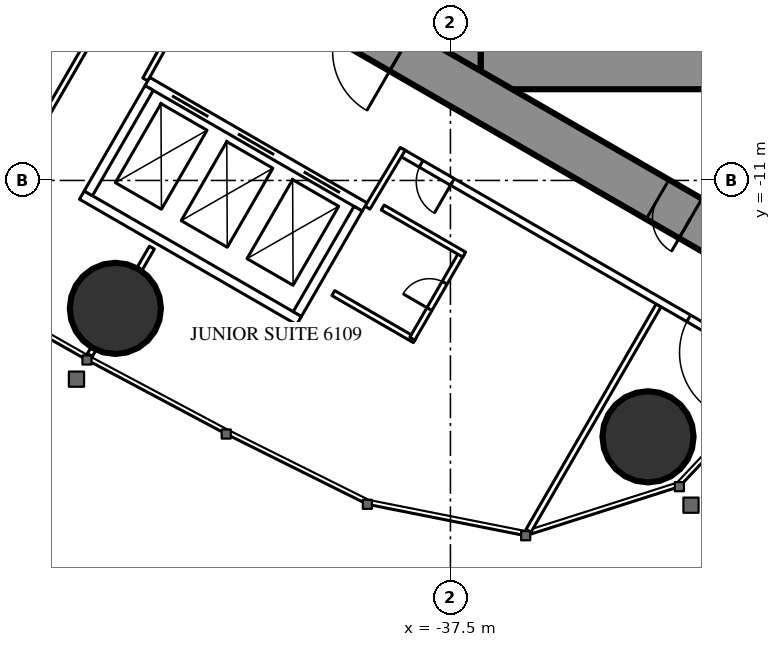
"""IFC4 building model, lengths in metres.
Left out: names, types, materials, properties, quantities, classifications, styles, units other than length and angle.
Written with IfcOpenShell. Run it as: python <this file> out.ifc"""

import sys

from ifc_helpers import new_model, si_unit, direction, frame, frame_2d, origin, origin_2d, place, context, subcontext, project, spatial, rectangle, circle, extrude, element, fill, save


model = new_model("IFC4")
c1 = context("Model", 3, precision=1e-05, world=origin(), true_north=direction((0.0, 1.0)))
c2 = subcontext(c1, "Body", "Model", "MODEL_VIEW")
j1 = project(units=[si_unit("LENGTHUNIT", "METRE"), si_unit("PLANEANGLEUNIT", "RADIAN")], contexts=[c1])
p1 = place(None, origin())
s1 = spatial("IfcSite", under=j1, at=p1, CompositionType="ELEMENT")
p2 = place(p1, origin())
s2 = spatial("IfcBuilding", under=s1, at=p2, CompositionType="ELEMENT")
p3 = place(p2, frame((0.0, 0.0, 229.7)))
s3 = spatial("IfcBuildingStorey", under=s2, at=p3, CompositionType="ELEMENT", Elevation=229.7)
for number, where, z_axis, x_axis in (
    (1, (-32.301, -17.745, 0.0), (0.0, 0.0, 1.0), (1.0, 0.0, 0.0)),
    (2, (-46.317, -14.365, 0.0), (0.0, 0.0, 1.0), (1.0, 0.0, 0.0)),
):
    element("IfcColumn", number, at=place(p3, frame(where, z_axis=z_axis, x_axis=x_axis)), inside=s3, PredefinedType="COLUMN", context=c2, shape_type="SweptSolid", body=[
        extrude(circle(Radius=1.2, at=origin_2d()), origin(), (0.0, 0.0, 1.0), 3.6),
    ])
p4 = place(p3, frame((-37.3, 8.6, 0.0), z_axis=(0.0, 0.0, 1.0), x_axis=(0.0, -1.0, 0.0)))
e3 = element("IfcWall", 3, at=p4, inside=s3, PredefinedType="SHEAR", context=c2, shape_type="SweptSolid", body=[
    extrude(rectangle(XDim=17.2, YDim=1.2, at=frame_2d((8.6, 0.0))), origin(), (0.0, 0.0, 1.0), 3.6),
])
p5 = place(p4, frame((7.7, 0.0, 0.0)))
e4 = element("IfcOpeningElement", 4, at=p5, cuts=e3, PredefinedType="OPENING", context=c2, shape_type="SweptSolid", body=[
    extrude(rectangle(XDim=1.8, YDim=2.2, at=frame_2d((0.9, 1.1))), frame((0.0, 0.61, 0.0), z_axis=(0.0, -1.0, 0.0), x_axis=(1.0, 0.0, 0.0)), (0.0, 0.0, 1.0), 1.22),
])
p6 = place(p3, frame((-28.3, -8.0, 0.0), z_axis=(0.0, 0.0, 1.0), x_axis=(-1.0, 0.0, 0.0)))
e5 = element("IfcWall", 5, at=p6, inside=s3, PredefinedType="SHEAR", context=c2, shape_type="SweptSolid", body=[
    extrude(rectangle(XDim=8.4, YDim=1.2, at=frame_2d((4.2, 0.0))), origin(), (0.0, 0.0, 1.0), 3.6),
])
p7 = place(p6, frame((0.25, 0.0, 0.0)))
e6 = element("IfcOpeningElement", 6, at=p7, cuts=e5, PredefinedType="OPENING", context=c2, shape_type="SweptSolid", body=[
    extrude(rectangle(XDim=1.0, YDim=2.2, at=frame_2d((0.5, 1.1))), frame((0.0, 0.61, 0.0), z_axis=(0.0, -1.0, 0.0), x_axis=(1.0, 0.0, 0.0)), (0.0, 0.0, 1.0), 1.22),
])
p8 = place(p3, frame((-27.2, -14.3, 0.0), z_axis=(0.0, 0.0, 1.0), x_axis=(-0.866024021859, 0.500002393557, 0.0)))
e7 = element("IfcWall", 7, at=p8, inside=s3, PredefinedType="SHEAR", context=c2, shape_type="SweptSolid", body=[
    extrude(rectangle(XDim=27.907, YDim=1.2, at=frame_2d((13.954, 0.0))), origin(), (0.0, 0.0, 1.0), 3.6),
])
p9 = place(p8, frame((4.6, 0.0, 0.0)))
e8 = element("IfcOpeningElement", 8, at=p9, cuts=e7, PredefinedType="OPENING", context=c2, shape_type="SweptSolid", body=[
    extrude(rectangle(XDim=1.0, YDim=2.2, at=frame_2d((0.5, 1.1))), frame((0.0, 0.61, 0.0), z_axis=(0.0, -1.0, 0.0), x_axis=(1.0, 0.0, 0.0)), (0.0, 0.0, 1.0), 1.22),
])
p10 = place(p8, frame((13.395, 0.0, 0.0)))
e9 = element("IfcOpeningElement", 9, at=p10, cuts=e7, PredefinedType="OPENING", context=c2, shape_type="SweptSolid", body=[
    extrude(rectangle(XDim=1.8, YDim=2.2, at=frame_2d((0.9, 1.1))), frame((0.0, 0.61, 0.0), z_axis=(0.0, -1.0, 0.0), x_axis=(1.0, 0.0, 0.0)), (0.0, 0.0, 1.0), 1.22),
])
p11 = place(p3, frame((-32.022, -14.287, 0.0), z_axis=(0.0, 0.0, 1.0), x_axis=(-0.50000019414, -0.866025291697, 0.0)))
e10 = element("IfcWall", 10, at=p11, inside=s3, PredefinedType="PARTITIONING", context=c2, shape_type="SweptSolid", body=[
    extrude(rectangle(XDim=6.848, YDim=0.15, at=frame_2d((3.424, 0.0))), origin(), (0.0, 0.0, 1.0), 3.35),
])
p12 = place(p3, frame((-46.898, -15.439, 0.0), z_axis=(0.0, 0.0, 1.0), x_axis=(-0.500232303069, -0.865891241997, 0.0)))
e11 = element("IfcWall", 11, at=p12, inside=s3, PredefinedType="PARTITIONING", context=c2, shape_type="SweptSolid", body=[
    extrude(rectangle(XDim=0.18, YDim=0.15, at=frame_2d((0.09, 0.0))), origin(), (0.0, 0.0, 1.0), 2.45),
])
p13 = place(p3, frame((-46.274, -6.059, 0.0), z_axis=(0.0, 0.0, 1.0), x_axis=(-0.500020471368, -0.866013584312, 0.0)))
e12 = element("IfcWall", 12, at=p13, inside=s3, PredefinedType="PARTITIONING", context=c2, shape_type="SweptSolid", body=[
    extrude(rectangle(XDim=6.028, YDim=0.15, at=frame_2d((3.014, 0.0))), origin(), (0.0, 0.0, 1.0), 2.45),
])
p14 = place(p3, frame((-45.356, -12.767, 0.0), z_axis=(0.0, 0.0, 1.0), x_axis=(-0.499886366516, -0.866091000168, 0.0)))
e13 = element("IfcWall", 13, at=p14, inside=s3, PredefinedType="PARTITIONING", context=c2, shape_type="SweptSolid", body=[
    extrude(rectangle(XDim=0.645, YDim=0.15, at=frame_2d((0.322, 0.0))), origin(), (0.0, 0.0, 1.0), 3.35),
])
p15 = place(p3, frame((-28.737, -16.068, 0.0), z_axis=(0.0, 0.0, 1.0), x_axis=(-0.866029399323, 0.49999307946, 0.0)))
e14 = element("IfcWall", 14, at=p15, inside=s3, PredefinedType="PARTITIONING", context=c2, shape_type="SweptSolid", body=[
    extrude(rectangle(XDim=11.61, YDim=0.2, at=frame_2d((5.805, 0.0))), origin(), (0.0, 0.0, 1.0), 3.35),
])
p16 = place(p15, frame((1.08, 0.0, 0.0)))
e15 = element("IfcOpeningElement", 15, at=p16, cuts=e14, PredefinedType="OPENING", context=c2, shape_type="SweptSolid", body=[
    extrude(rectangle(XDim=1.8, YDim=2.04, at=frame_2d((0.9, 1.02))), frame((0.0, 0.11, 0.0), z_axis=(0.0, -1.0, 0.0), x_axis=(1.0, 0.0, 0.0)), (0.0, 0.0, 1.0), 0.22),
])
p17 = place(p15, frame((10.06, 0.0, 0.0)))
e16 = element("IfcOpeningElement", 16, at=p17, cuts=e14, PredefinedType="OPENING", context=c2, shape_type="SweptSolid", body=[
    extrude(rectangle(XDim=0.95, YDim=2.2, at=frame_2d((0.475, 1.1))), frame((0.0, 0.11, 0.0), z_axis=(0.0, -1.0, 0.0), x_axis=(1.0, 0.0, 0.0)), (0.0, 0.0, 1.0), 0.22),
])
for number, where, z_axis, x_axis in (
    (17, (-39.683, -11.718, 0.0), (0.0, 0.0, 1.0), (0.514, 0.858, 0.0)),
    (18, (-44.652, -6.764, 0.0), (0.0, 0.0, 1.0), (-0.485, -0.874, 0.0)),
):
    element("IfcWall", number, at=place(p3, frame(where, z_axis=z_axis, x_axis=x_axis)), inside=s3, PredefinedType="PARTITIONING", context=c2, shape_type="SweptSolid", body=[
        extrude(rectangle(XDim=1.805, YDim=0.15, at=frame_2d((0.903, 0.0))), origin(), (0.0, 0.0, 1.0), 3.35),
    ])
p18 = place(p3, frame((-38.438, -15.202, 0.0), z_axis=(0.0, 0.0, 1.0), x_axis=(-0.866073894602, 0.499916002032, 0.0)))
e19 = element("IfcWall", 19, at=p18, inside=s3, PredefinedType="PARTITIONING", context=c2, shape_type="SweptSolid", body=[
    extrude(rectangle(XDim=2.475, YDim=0.15, at=frame_2d((1.238, 0.0))), origin(), (0.0, 0.0, 1.0), 3.35),
])
p19 = place(p3, frame((-37.203, -12.913, 0.0), z_axis=(0.0, 0.0, 1.0), x_axis=(-0.500006934395, -0.866021400173, 0.0)))
e20 = element("IfcWall", 20, at=p19, inside=s3, PredefinedType="PARTITIONING", context=c2, shape_type="SweptSolid", body=[
    extrude(rectangle(XDim=2.6, YDim=0.15, at=frame_2d((1.3, 0.0))), origin(), (0.0, 0.0, 1.0), 3.35),
])
p20 = place(p19, frame((0.9, 0.0, 0.0)))
e21 = element("IfcOpeningElement", 21, at=p20, cuts=e20, PredefinedType="OPENING", context=c2, shape_type="SweptSolid", body=[
    extrude(rectangle(XDim=0.8, YDim=2.2, at=frame_2d((0.4, 1.1))), frame((0.0, 0.085, 0.0), z_axis=(0.0, -1.0, 0.0), x_axis=(1.0, 0.0, 0.0)), (0.0, 0.0, 1.0), 0.17),
])
p21 = place(p3, frame((-37.138, -12.95, 0.0), z_axis=(0.0, 0.0, 1.0), x_axis=(-0.866031185235, 0.4999899861, 0.0)))
e22 = element("IfcWall", 22, at=p21, inside=s3, PredefinedType="PARTITIONING", context=c2, shape_type="SweptSolid", body=[
    extrude(rectangle(XDim=2.475, YDim=0.15, at=frame_2d((1.238, 0.0))), origin(), (0.0, 0.0, 1.0), 2.5),
])
p22 = place(p3, frame((-39.758, -11.697, 0.0), z_axis=(0.0, 0.0, 1.0), x_axis=(-0.866024194504, 0.500002094529, 0.0)))
e23 = element("IfcWall", 23, at=p22, inside=s3, PredefinedType="PARTITIONING", context=c2, shape_type="SweptSolid", body=[
    extrude(rectangle(XDim=6.6, YDim=0.25, at=frame_2d((3.3, 0.0))), origin(), (0.0, 0.0, 1.0), 3.35),
])
p23 = place(p22, frame((0.75, 0.0, 0.0)))
e24 = element("IfcOpeningElement", 24, at=p23, cuts=e23, PredefinedType="OPENING", context=c2, shape_type="SweptSolid", body=[
    extrude(rectangle(XDim=1.1, YDim=2.2, at=frame_2d((0.55, 1.1))), frame((0.0, 0.135, 0.0), z_axis=(0.0, -1.0, 0.0), x_axis=(1.0, 0.0, 0.0)), (0.0, 0.0, 1.0), 0.27),
])
p24 = place(p22, frame((2.75, 0.0, 0.0)))
e25 = element("IfcOpeningElement", 25, at=p24, cuts=e23, PredefinedType="OPENING", context=c2, shape_type="SweptSolid", body=[
    extrude(rectangle(XDim=1.1, YDim=2.2, at=frame_2d((0.55, 1.1))), frame((0.0, 0.135, 0.0), z_axis=(0.0, -1.0, 0.0), x_axis=(1.0, 0.0, 0.0)), (0.0, 0.0, 1.0), 0.27),
])
p25 = place(p22, frame((4.75, 0.0, 0.0)))
e26 = element("IfcOpeningElement", 26, at=p25, cuts=e23, PredefinedType="OPENING", context=c2, shape_type="SweptSolid", body=[
    extrude(rectangle(XDim=1.1, YDim=2.2, at=frame_2d((0.55, 1.1))), frame((0.0, 0.135, 0.0), z_axis=(0.0, -1.0, 0.0), x_axis=(1.0, 0.0, 0.0)), (0.0, 0.0, 1.0), 0.27),
])
p26 = place(p3, frame((-41.482, -14.686, 0.0), z_axis=(0.0, 0.0, 1.0), x_axis=(-0.86603344179, 0.499986077507, 0.0)))
e27 = element("IfcWall", 27, at=p26, inside=s3, PredefinedType="PARTITIONING", context=c2, shape_type="SweptSolid", body=[
    extrude(rectangle(XDim=6.6, YDim=0.25, at=frame_2d((3.3, 0.0))), origin(), (0.0, 0.0, 1.0), 3.35),
])
for number, where, z_axis, x_axis in (
    (28, (-39.928, -11.743, 0.0), (0.0, 0.0, 1.0), (-0.5, -0.866, 0.0)),
    (29, (-45.428, -8.568, 0.0), (0.0, 0.0, 1.0), (-0.5, -0.866, 0.0)),
):
    element("IfcWall", number, at=place(p3, frame(where, z_axis=z_axis, x_axis=x_axis)), inside=s3, PredefinedType="PARTITIONING", context=c2, shape_type="SweptSolid", body=[
        extrude(rectangle(XDim=3.201, YDim=0.25, at=frame_2d((1.6, 0.0))), origin(), (0.0, 0.0, 1.0), 3.35),
    ])
p27 = place(p16, origin())
e30 = element("IfcDoor", 30, at=p27, inside=s3, OperationType="DOUBLE_DOOR_SINGLE_SWING", PredefinedType="DOOR", context=c2, shape_type="SweptSolid", body=[
    extrude(rectangle(XDim=1.8, YDim=2.04, at=frame_2d((0.9, 1.02))), frame((0.0, 0.025, 0.0), z_axis=(0.0, -1.0, 0.0), x_axis=(1.0, 0.0, 0.0)), (0.0, 0.0, 1.0), 0.05),
])
fill(e15, e30)
p28 = place(p20, origin())
e31 = element("IfcDoor", 31, at=p28, inside=s3, OperationType="SINGLE_SWING_RIGHT", PredefinedType="DOOR", context=c2, shape_type="SweptSolid", body=[
    extrude(rectangle(XDim=0.8, YDim=2.2, at=frame_2d((0.4, 1.1))), frame((0.0, 0.025, 0.0), z_axis=(0.0, -1.0, 0.0), x_axis=(1.0, 0.0, 0.0)), (0.0, 0.0, 1.0), 0.05),
])
fill(e21, e31)
p29 = place(p17, origin())
e32 = element("IfcDoor", 32, at=p29, inside=s3, OperationType="SINGLE_SWING_LEFT", PredefinedType="DOOR", context=c2, shape_type="SweptSolid", body=[
    extrude(rectangle(XDim=0.95, YDim=2.2, at=frame_2d((0.475, 1.1))), frame((0.0, 0.025, 0.0), z_axis=(0.0, -1.0, 0.0), x_axis=(1.0, 0.0, 0.0)), (0.0, 0.0, 1.0), 0.05),
])
fill(e16, e32)
p30 = place(p9, origin())
e33 = element("IfcDoor", 33, at=p30, inside=s3, OperationType="SINGLE_SWING_LEFT", PredefinedType="DOOR", context=c2, shape_type="SweptSolid", body=[
    extrude(rectangle(XDim=1.0, YDim=2.2, at=frame_2d((0.5, 1.1))), frame((0.0, 0.025, 0.0), z_axis=(0.0, -1.0, 0.0), x_axis=(1.0, 0.0, 0.0)), (0.0, 0.0, 1.0), 0.05),
])
fill(e8, e33)
p31 = place(p23, origin())
e34 = element("IfcDoor", 34, at=p31, inside=s3, OperationType="DOUBLE_DOOR_SLIDING", PredefinedType="USERDEFINED", context=c2, shape_type="SweptSolid", body=[
    extrude(rectangle(XDim=1.1, YDim=2.2, at=frame_2d((0.55, 1.1))), frame((0.0, 0.025, 0.0), z_axis=(0.0, -1.0, 0.0), x_axis=(1.0, 0.0, 0.0)), (0.0, 0.0, 1.0), 0.05),
])
fill(e24, e34)
p32 = place(p24, origin())
e35 = element("IfcDoor", 35, at=p32, inside=s3, OperationType="DOUBLE_DOOR_SLIDING", PredefinedType="USERDEFINED", context=c2, shape_type="SweptSolid", body=[
    extrude(rectangle(XDim=1.1, YDim=2.2, at=frame_2d((0.55, 1.1))), frame((0.0, 0.025, 0.0), z_axis=(0.0, -1.0, 0.0), x_axis=(1.0, 0.0, 0.0)), (0.0, 0.0, 1.0), 0.05),
])
fill(e25, e35)
p33 = place(p25, origin())
e36 = element("IfcDoor", 36, at=p33, inside=s3, OperationType="DOUBLE_DOOR_SLIDING", PredefinedType="USERDEFINED", context=c2, shape_type="SweptSolid", body=[
    extrude(rectangle(XDim=1.1, YDim=2.2, at=frame_2d((0.55, 1.1))), frame((0.0, 0.025, 0.0), z_axis=(0.0, -1.0, 0.0), x_axis=(1.0, 0.0, 0.0)), (0.0, 0.0, 1.0), 0.05),
])
fill(e26, e36)
save(model, sys.argv[1])
